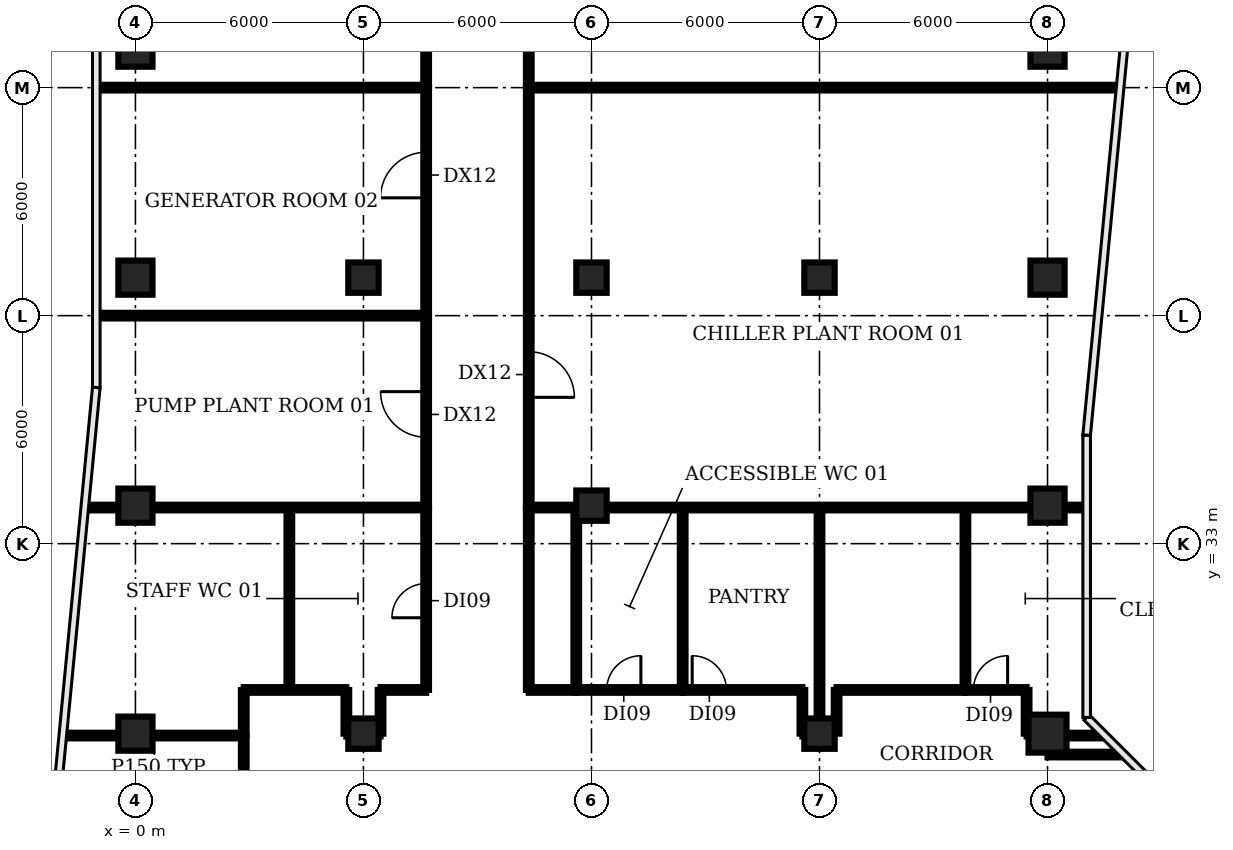
"""IFC4 building model, lengths in metres.
Left out: names, types, materials, properties, quantities, classifications, styles, units other than length and angle.
Written with IfcOpenShell. Run it as: python <this file> out.ifc"""

import sys

from ifc_helpers import new_model, si_unit, direction, frame, frame_2d, origin, origin_2d, place, context, subcontext, project, spatial, rectangle, circle, extrude, element, fill, save


model = new_model("IFC4")
c1 = context("Model", 3, precision=1e-05, world=origin(), true_north=direction((0.0, 1.0)))
c2 = subcontext(c1, "Body", "Model", "MODEL_VIEW")
j1 = project(units=[si_unit("LENGTHUNIT", "METRE"), si_unit("PLANEANGLEUNIT", "RADIAN")], contexts=[c1])
p1 = place(None, origin())
s1 = spatial("IfcSite", under=j1, at=p1, CompositionType="ELEMENT")
p2 = place(p1, origin())
s2 = spatial("IfcBuilding", under=s1, at=p2, CompositionType="ELEMENT")
p3 = place(p2, frame((0.0, 0.0, 251.6)))
s3 = spatial("IfcBuildingStorey", under=s2, at=p3, CompositionType="ELEMENT", Elevation=251.6)
for number, where, z_axis, x_axis in (
    (1, (0.0, 28.0, 0.0), (0.0, 0.0, 1.0), (1.0, 0.0, 0.0)),
    (2, (0.0, 34.0, 0.0), (0.0, 0.0, 1.0), (1.0, 0.0, 0.0)),
    (3, (0.0, 40.0, 0.0), (0.0, 0.0, 1.0), (1.0, 0.0, 0.0)),
    (4, (0.0, 46.0, 0.0), (0.0, 0.0, 1.0), (1.0, 0.0, 0.0)),
):
    element("IfcColumn", number, at=place(p3, frame(where, z_axis=z_axis, x_axis=x_axis)), inside=s3, PredefinedType="COLUMN", context=c2, shape_type="SweptSolid", body=[
        extrude(rectangle(XDim=0.9, YDim=0.9, at=origin_2d()), origin(), (0.0, 0.0, 1.0), 3.2),
    ])
for number, where, z_axis, x_axis in (
    (5, (6.0, 28.0, 0.0), (0.0, 0.0, 1.0), (1.0, 0.0, 0.0)),
    (6, (6.0, 40.0, 0.0), (0.0, 0.0, 1.0), (1.0, 0.0, 0.0)),
    (7, (12.0, 34.0, 0.0), (0.0, 0.0, 1.0), (1.0, 0.0, 0.0)),
    (8, (12.0, 40.0, 0.0), (0.0, 0.0, 1.0), (1.0, 0.0, 0.0)),
    (9, (18.0, 28.0, 0.0), (0.0, 0.0, 1.0), (1.0, 0.0, 0.0)),
    (10, (18.0, 40.0, 0.0), (0.0, 0.0, 1.0), (1.0, 0.0, 0.0)),
):
    element("IfcColumn", number, at=place(p3, frame(where, z_axis=z_axis, x_axis=x_axis)), inside=s3, PredefinedType="COLUMN", context=c2, shape_type="SweptSolid", body=[
        extrude(rectangle(XDim=0.8, YDim=0.8, at=origin_2d()), origin(), (0.0, 0.0, 1.0), 3.2),
    ])
p4 = place(p3, frame((24.0, 28.0, 0.0), z_axis=(0.0, 0.0, 1.0), x_axis=(1.0, 0.0, 0.0)))
e11 = element("IfcColumn", 11, at=p4, inside=s3, PredefinedType="COLUMN", context=c2, shape_type="SweptSolid", body=[
    extrude(circle(Radius=0.5, at=origin_2d()), origin(), (0.0, 0.0, 1.0), 3.2),
])
for number, where, z_axis, x_axis in (
    (12, (24.0, 34.0, 0.0), (0.0, 0.0, 1.0), (1.0, 0.0, 0.0)),
    (13, (24.0, 40.0, 0.0), (0.0, 0.0, 1.0), (1.0, 0.0, 0.0)),
    (14, (24.0, 46.0, 0.0), (0.0, 0.0, 1.0), (1.0, 0.0, 0.0)),
):
    element("IfcColumn", number, at=place(p3, frame(where, z_axis=z_axis, x_axis=x_axis)), inside=s3, PredefinedType="COLUMN", context=c2, shape_type="SweptSolid", body=[
        extrude(rectangle(XDim=0.9, YDim=0.9, at=origin_2d()), origin(), (0.0, 0.0, 1.0), 3.2),
    ])
p5 = place(p3, frame((-1.86, 27.95, 0.0), z_axis=(0.0, 0.0, 1.0), x_axis=(1.0, 0.0, 0.0)))
e15 = element("IfcWall", 15, at=p5, inside=s3, PredefinedType="PARTITIONING", context=c2, shape_type="SweptSolid", body=[
    extrude(rectangle(XDim=4.71, YDim=0.15, at=frame_2d((2.355, 0.0))), origin(), (0.0, 0.0, 1.0), 2.83),
])
p6 = place(p3, frame((-1.28, 33.95, 0.0), z_axis=(0.0, 0.0, 1.0), x_axis=(1.0, 0.0, 0.0)))
e16 = element("IfcWall", 16, at=p6, inside=s3, PredefinedType="PARTITIONING", context=c2, shape_type="SweptSolid", body=[
    extrude(rectangle(XDim=8.93, YDim=0.15, at=frame_2d((4.465, 0.0))), origin(), (0.0, 0.0, 1.0), 2.83),
])
for number, where, z_axis, x_axis in (
    (17, (-0.98, 39.0, 0.0), (0.0, 0.0, 1.0), (1.0, 0.0, 0.0)),
    (18, (-0.98, 45.0, 0.0), (0.0, 0.0, 1.0), (1.0, 0.0, 0.0)),
):
    element("IfcWall", number, at=place(p3, frame(where, z_axis=z_axis, x_axis=x_axis)), inside=s3, PredefinedType="PARTITIONING", context=c2, shape_type="SweptSolid", body=[
        extrude(rectangle(XDim=8.63, YDim=0.15, at=frame_2d((4.315, 0.0))), origin(), (0.0, 0.0, 1.0), 2.83),
    ])
p7 = place(p3, frame((2.85, 25.25, 0.0), z_axis=(0.0, 0.0, 1.0), x_axis=(0.0, 1.0, 0.0)))
e19 = element("IfcWall", 19, at=p7, inside=s3, PredefinedType="PARTITIONING", context=c2, shape_type="SweptSolid", body=[
    extrude(rectangle(XDim=2.7, YDim=0.15, at=frame_2d((1.35, 0.0))), origin(), (0.0, 0.0, 1.0), 2.83),
])
p8 = place(p3, frame((2.85, 27.95, 0.0), z_axis=(0.0, 0.0, 1.0), x_axis=(0.0, 1.0, 0.0)))
e20 = element("IfcWall", 20, at=p8, inside=s3, PredefinedType="PARTITIONING", context=c2, shape_type="SweptSolid", body=[
    extrude(rectangle(XDim=1.2, YDim=0.15, at=frame_2d((0.6, 0.0))), origin(), (0.0, 0.0, 1.0), 2.83),
])
p9 = place(p3, frame((2.85, 29.15, 0.0), z_axis=(0.0, 0.0, 1.0), x_axis=(1.0, 0.0, 0.0)))
e21 = element("IfcWall", 21, at=p9, inside=s3, PredefinedType="PARTITIONING", context=c2, shape_type="SweptSolid", body=[
    extrude(rectangle(XDim=2.7, YDim=0.15, at=frame_2d((1.35, 0.0))), origin(), (0.0, 0.0, 1.0), 2.83),
])
p10 = place(p3, frame((4.05, 29.15, 0.0), z_axis=(0.0, 0.0, 1.0), x_axis=(0.0, 1.0, 0.0)))
e22 = element("IfcWall", 22, at=p10, inside=s3, PredefinedType="PARTITIONING", context=c2, shape_type="SweptSolid", body=[
    extrude(rectangle(XDim=4.8, YDim=0.15, at=frame_2d((2.4, 0.0))), origin(), (0.0, 0.0, 1.0), 2.83),
])
p11 = place(p3, frame((5.55, 28.0, 0.0), z_axis=(0.0, 0.0, 1.0), x_axis=(0.0, 1.0, 0.0)))
e23 = element("IfcWall", 23, at=p11, inside=s3, PredefinedType="PARTITIONING", context=c2, shape_type="SweptSolid", body=[
    extrude(rectangle(XDim=1.15, YDim=0.15, at=frame_2d((0.575, 0.0))), origin(), (0.0, 0.0, 1.0), 2.83),
])
p12 = place(p3, frame((5.55, 28.0, 0.0), z_axis=(0.0, 0.0, 1.0), x_axis=(1.0, 0.0, 0.0)))
e24 = element("IfcWall", 24, at=p12, inside=s3, PredefinedType="PARTITIONING", context=c2, shape_type="SweptSolid", body=[
    extrude(rectangle(XDim=0.9, YDim=0.15, at=frame_2d((0.45, 0.0))), origin(), (0.0, 0.0, 1.0), 2.83),
])
p13 = place(p3, frame((6.45, 28.0, 0.0), z_axis=(0.0, 0.0, 1.0), x_axis=(0.0, 1.0, 0.0)))
e25 = element("IfcWall", 25, at=p13, inside=s3, PredefinedType="PARTITIONING", context=c2, shape_type="SweptSolid", body=[
    extrude(rectangle(XDim=1.15, YDim=0.15, at=frame_2d((0.575, 0.0))), origin(), (0.0, 0.0, 1.0), 2.83),
])
p14 = place(p3, frame((6.45, 29.15, 0.0), z_axis=(0.0, 0.0, 1.0), x_axis=(1.0, 0.0, 0.0)))
e26 = element("IfcWall", 26, at=p14, inside=s3, PredefinedType="PARTITIONING", context=c2, shape_type="SweptSolid", body=[
    extrude(rectangle(XDim=1.2, YDim=0.15, at=frame_2d((0.6, 0.0))), origin(), (0.0, 0.0, 1.0), 2.83),
])
p15 = place(p3, frame((7.65, 29.15, 0.0), z_axis=(0.0, 0.0, 1.0), x_axis=(0.0, 1.0, 0.0)))
e27 = element("IfcWall", 27, at=p15, inside=s3, PredefinedType="PARTITIONING", context=c2, shape_type="SweptSolid", body=[
    extrude(rectangle(XDim=4.8, YDim=0.15, at=frame_2d((2.4, 0.0))), origin(), (0.0, 0.0, 1.0), 2.83),
])
p16 = place(p15, frame((1.9, 0.0, 0.0)))
e28 = element("IfcOpeningElement", 28, at=p16, cuts=e27, PredefinedType="OPENING", context=c2, shape_type="SweptSolid", body=[
    extrude(rectangle(XDim=0.9, YDim=2.1, at=frame_2d((0.45, 1.05))), frame((0.0, 0.085, 0.0), z_axis=(0.0, -1.0, 0.0), x_axis=(1.0, 0.0, 0.0)), (0.0, 0.0, 1.0), 0.17),
])
p17 = place(p3, frame((7.65, 33.95, 0.0), z_axis=(0.0, 0.0, 1.0), x_axis=(0.0, 1.0, 0.0)))
e29 = element("IfcWall", 29, at=p17, inside=s3, PredefinedType="PARTITIONING", context=c2, shape_type="SweptSolid", body=[
    extrude(rectangle(XDim=5.05, YDim=0.15, at=frame_2d((2.525, 0.0))), origin(), (0.0, 0.0, 1.0), 2.83),
])
p18 = place(p17, frame((1.85, 0.0, 0.0)))
e30 = element("IfcOpeningElement", 30, at=p18, cuts=e29, PredefinedType="OPENING", context=c2, shape_type="SweptSolid", body=[
    extrude(rectangle(XDim=1.2, YDim=2.1, at=frame_2d((0.6, 1.05))), frame((0.0, 0.085, 0.0), z_axis=(0.0, -1.0, 0.0), x_axis=(1.0, 0.0, 0.0)), (0.0, 0.0, 1.0), 0.17),
])
p19 = place(p3, frame((7.65, 39.0, 0.0), z_axis=(0.0, 0.0, 1.0), x_axis=(0.0, 1.0, 0.0)))
e31 = element("IfcWall", 31, at=p19, inside=s3, PredefinedType="PARTITIONING", context=c2, shape_type="SweptSolid", body=[
    extrude(rectangle(XDim=6.0, YDim=0.15, at=frame_2d((3.0, 0.0))), origin(), (0.0, 0.0, 1.0), 2.83),
])
p20 = place(p19, frame((3.1, 0.0, 0.0)))
e32 = element("IfcOpeningElement", 32, at=p20, cuts=e31, PredefinedType="OPENING", context=c2, shape_type="SweptSolid", body=[
    extrude(rectangle(XDim=1.2, YDim=2.1, at=frame_2d((0.6, 1.05))), frame((0.0, 0.085, 0.0), z_axis=(0.0, -1.0, 0.0), x_axis=(1.0, 0.0, 0.0)), (0.0, 0.0, 1.0), 0.17),
])
p21 = place(p3, frame((7.65, 45.0, 0.0), z_axis=(0.0, 0.0, 1.0), x_axis=(0.0, 1.0, 0.0)))
e33 = element("IfcWall", 33, at=p21, inside=s3, PredefinedType="PARTITIONING", context=c2, shape_type="SweptSolid", body=[
    extrude(rectangle(XDim=12.0, YDim=0.15, at=frame_2d((6.0, 0.0))), origin(), (0.0, 0.0, 1.0), 2.83),
])
p22 = place(p21, frame((3.7, 0.0, 0.0)))
e34 = element("IfcOpeningElement", 34, at=p22, cuts=e33, PredefinedType="OPENING", context=c2, shape_type="SweptSolid", body=[
    extrude(rectangle(XDim=1.2, YDim=2.1, at=frame_2d((0.6, 1.05))), frame((0.0, 0.085, 0.0), z_axis=(0.0, -1.0, 0.0), x_axis=(1.0, 0.0, 0.0)), (0.0, 0.0, 1.0), 0.17),
])
p23 = place(p3, frame((10.35, 29.15, 0.0), z_axis=(0.0, 0.0, 1.0), x_axis=(0.0, 1.0, 0.0)))
e35 = element("IfcWall", 35, at=p23, inside=s3, PredefinedType="PARTITIONING", context=c2, shape_type="SweptSolid", body=[
    extrude(rectangle(XDim=4.8, YDim=0.15, at=frame_2d((2.4, 0.0))), origin(), (0.0, 0.0, 1.0), 2.83),
])
p24 = place(p3, frame((10.35, 29.15, 0.0), z_axis=(0.0, 0.0, 1.0), x_axis=(1.0, 0.0, 0.0)))
e36 = element("IfcWall", 36, at=p24, inside=s3, PredefinedType="PARTITIONING", context=c2, shape_type="SweptSolid", body=[
    extrude(rectangle(XDim=1.25, YDim=0.15, at=frame_2d((0.625, 0.0))), origin(), (0.0, 0.0, 1.0), 2.83),
])
p25 = place(p3, frame((10.35, 33.95, 0.0), z_axis=(0.0, 0.0, 1.0), x_axis=(1.0, 0.0, 0.0)))
e37 = element("IfcWall", 37, at=p25, inside=s3, PredefinedType="PARTITIONING", context=c2, shape_type="SweptSolid", body=[
    extrude(rectangle(XDim=14.63, YDim=0.15, at=frame_2d((7.315, 0.0))), origin(), (0.0, 0.0, 1.0), 2.83),
])
p26 = place(p3, frame((10.35, 45.0, 0.0), z_axis=(0.0, 0.0, 1.0), x_axis=(0.0, -1.0, 0.0)))
e38 = element("IfcWall", 38, at=p26, inside=s3, PredefinedType="PARTITIONING", context=c2, shape_type="SweptSolid", body=[
    extrude(rectangle(XDim=11.05, YDim=0.15, at=frame_2d((5.525, 0.0))), origin(), (0.0, 0.0, 1.0), 2.83),
])
p27 = place(p26, frame((6.95, 0.0, 0.0)))
e39 = element("IfcOpeningElement", 39, at=p27, cuts=e38, PredefinedType="OPENING", context=c2, shape_type="SweptSolid", body=[
    extrude(rectangle(XDim=1.2, YDim=2.1, at=frame_2d((0.6, 1.05))), frame((0.0, 0.085, 0.0), z_axis=(0.0, -1.0, 0.0), x_axis=(1.0, 0.0, 0.0)), (0.0, 0.0, 1.0), 0.17),
])
p28 = place(p3, frame((10.35, 45.0, 0.0), z_axis=(0.0, 0.0, 1.0), x_axis=(1.0, 0.0, 0.0)))
e40 = element("IfcWall", 40, at=p28, inside=s3, PredefinedType="PARTITIONING", context=c2, shape_type="SweptSolid", body=[
    extrude(rectangle(XDim=15.51, YDim=0.15, at=frame_2d((7.755, 0.0))), origin(), (0.0, 0.0, 1.0), 2.83),
])
p29 = place(p3, frame((10.35, 51.0, 0.0), z_axis=(0.0, 0.0, 1.0), x_axis=(0.0, -1.0, 0.0)))
e41 = element("IfcWall", 41, at=p29, inside=s3, PredefinedType="PARTITIONING", context=c2, shape_type="SweptSolid", body=[
    extrude(rectangle(XDim=6.0, YDim=0.15, at=frame_2d((3.0, 0.0))), origin(), (0.0, 0.0, 1.0), 2.83),
])
p30 = place(p29, frame((2.5, 0.0, 0.0)))
e42 = element("IfcOpeningElement", 42, at=p30, cuts=e41, PredefinedType="OPENING", context=c2, shape_type="SweptSolid", body=[
    extrude(rectangle(XDim=1.2, YDim=2.1, at=frame_2d((0.6, 1.05))), frame((0.0, 0.085, 0.0), z_axis=(0.0, -1.0, 0.0), x_axis=(1.0, 0.0, 0.0)), (0.0, 0.0, 1.0), 0.17),
])
p31 = place(p3, frame((11.6, 29.15, 0.0), z_axis=(0.0, 0.0, 1.0), x_axis=(0.0, 1.0, 0.0)))
e43 = element("IfcWall", 43, at=p31, inside=s3, PredefinedType="PARTITIONING", context=c2, shape_type="SweptSolid", body=[
    extrude(rectangle(XDim=4.6, YDim=0.15, at=frame_2d((2.3, 0.0))), origin(), (0.0, 0.0, 1.0), 2.83),
])
p32 = place(p3, frame((11.6, 29.15, 0.0), z_axis=(0.0, 0.0, 1.0), x_axis=(1.0, 0.0, 0.0)))
e44 = element("IfcWall", 44, at=p32, inside=s3, PredefinedType="PARTITIONING", context=c2, shape_type="SweptSolid", body=[
    extrude(rectangle(XDim=2.8, YDim=0.15, at=frame_2d((1.4, 0.0))), origin(), (0.0, 0.0, 1.0), 2.83),
])
p33 = place(p32, frame((0.8, 0.0, 0.0)))
e45 = element("IfcOpeningElement", 45, at=p33, cuts=e44, PredefinedType="OPENING", context=c2, shape_type="SweptSolid", body=[
    extrude(rectangle(XDim=0.9, YDim=2.1, at=frame_2d((0.45, 1.05))), frame((0.0, 0.085, 0.0), z_axis=(0.0, -1.0, 0.0), x_axis=(1.0, 0.0, 0.0)), (0.0, 0.0, 1.0), 0.17),
])
p34 = place(p3, frame((14.4, 29.15, 0.0), z_axis=(0.0, 0.0, 1.0), x_axis=(0.0, 1.0, 0.0)))
e46 = element("IfcWall", 46, at=p34, inside=s3, PredefinedType="PARTITIONING", context=c2, shape_type="SweptSolid", body=[
    extrude(rectangle(XDim=4.8, YDim=0.15, at=frame_2d((2.4, 0.0))), origin(), (0.0, 0.0, 1.0), 2.83),
])
p35 = place(p3, frame((14.4, 29.15, 0.0), z_axis=(0.0, 0.0, 1.0), x_axis=(1.0, 0.0, 0.0)))
e47 = element("IfcWall", 47, at=p35, inside=s3, PredefinedType="PARTITIONING", context=c2, shape_type="SweptSolid", body=[
    extrude(rectangle(XDim=3.15, YDim=0.15, at=frame_2d((1.575, 0.0))), origin(), (0.0, 0.0, 1.0), 2.83),
])
p36 = place(p35, frame((0.25, 0.0, 0.0)))
e48 = element("IfcOpeningElement", 48, at=p36, cuts=e47, PredefinedType="OPENING", context=c2, shape_type="SweptSolid", body=[
    extrude(rectangle(XDim=0.9, YDim=2.1, at=frame_2d((0.45, 1.05))), frame((0.0, 0.085, 0.0), z_axis=(0.0, -1.0, 0.0), x_axis=(1.0, 0.0, 0.0)), (0.0, 0.0, 1.0), 0.17),
])
p37 = place(p3, frame((17.55, 28.0, 0.0), z_axis=(0.0, 0.0, 1.0), x_axis=(0.0, 1.0, 0.0)))
e49 = element("IfcWall", 49, at=p37, inside=s3, PredefinedType="PARTITIONING", context=c2, shape_type="SweptSolid", body=[
    extrude(rectangle(XDim=1.15, YDim=0.15, at=frame_2d((0.575, 0.0))), origin(), (0.0, 0.0, 1.0), 2.83),
])
p38 = place(p3, frame((17.55, 28.0, 0.0), z_axis=(0.0, 0.0, 1.0), x_axis=(1.0, 0.0, 0.0)))
e50 = element("IfcWall", 50, at=p38, inside=s3, PredefinedType="PARTITIONING", context=c2, shape_type="SweptSolid", body=[
    extrude(rectangle(XDim=0.45, YDim=0.15, at=frame_2d((0.225, 0.0))), origin(), (0.0, 0.0, 1.0), 2.83),
])
p39 = place(p3, frame((18.0, 28.0, 0.0), z_axis=(0.0, 0.0, 1.0), x_axis=(0.0, 1.0, 0.0)))
e51 = element("IfcWall", 51, at=p39, inside=s3, PredefinedType="PARTITIONING", context=c2, shape_type="SweptSolid", body=[
    extrude(rectangle(XDim=5.95, YDim=0.15, at=frame_2d((2.975, 0.0))), origin(), (0.0, 0.0, 1.0), 2.83),
])
p40 = place(p3, frame((18.45, 28.0, 0.0), z_axis=(0.0, 0.0, 1.0), x_axis=(0.0, 1.0, 0.0)))
e52 = element("IfcWall", 52, at=p40, inside=s3, PredefinedType="PARTITIONING", context=c2, shape_type="SweptSolid", body=[
    extrude(rectangle(XDim=1.15, YDim=0.15, at=frame_2d((0.575, 0.0))), origin(), (0.0, 0.0, 1.0), 2.83),
])
p41 = place(p3, frame((18.45, 29.15, 0.0), z_axis=(0.0, 0.0, 1.0), x_axis=(1.0, 0.0, 0.0)))
e53 = element("IfcWall", 53, at=p41, inside=s3, PredefinedType="PARTITIONING", context=c2, shape_type="SweptSolid", body=[
    extrude(rectangle(XDim=3.39, YDim=0.15, at=frame_2d((1.695, 0.0))), origin(), (0.0, 0.0, 1.0), 2.83),
])
p42 = place(p3, frame((21.84, 29.15, 0.0), z_axis=(0.0, 0.0, 1.0), x_axis=(0.0, 1.0, 0.0)))
e54 = element("IfcWall", 54, at=p42, inside=s3, PredefinedType="PARTITIONING", context=c2, shape_type="SweptSolid", body=[
    extrude(rectangle(XDim=4.8, YDim=0.15, at=frame_2d((2.4, 0.0))), origin(), (0.0, 0.0, 1.0), 2.83),
])
p43 = place(p3, frame((21.84, 29.15, 0.0), z_axis=(0.0, 0.0, 1.0), x_axis=(1.0, 0.0, 0.0)))
e55 = element("IfcWall", 55, at=p43, inside=s3, PredefinedType="PARTITIONING", context=c2, shape_type="SweptSolid", body=[
    extrude(rectangle(XDim=1.61, YDim=0.15, at=frame_2d((0.805, 0.0))), origin(), (0.0, 0.0, 1.0), 2.83),
])
p44 = place(p43, frame((0.21, 0.0, 0.0)))
e56 = element("IfcOpeningElement", 56, at=p44, cuts=e55, PredefinedType="OPENING", context=c2, shape_type="SweptSolid", body=[
    extrude(rectangle(XDim=0.9, YDim=2.1, at=frame_2d((0.45, 1.05))), frame((0.0, 0.085, 0.0), z_axis=(0.0, -1.0, 0.0), x_axis=(1.0, 0.0, 0.0)), (0.0, 0.0, 1.0), 0.17),
])
p45 = place(p3, frame((23.45, 28.0, 0.0), z_axis=(0.0, 0.0, 1.0), x_axis=(0.0, 1.0, 0.0)))
e57 = element("IfcWall", 57, at=p45, inside=s3, PredefinedType="PARTITIONING", context=c2, shape_type="SweptSolid", body=[
    extrude(rectangle(XDim=1.15, YDim=0.15, at=frame_2d((0.575, 0.0))), origin(), (0.0, 0.0, 1.0), 2.83),
])
p46 = place(p3, frame((23.45, 28.0, 0.0), z_axis=(0.0, 0.0, 1.0), x_axis=(1.0, 0.0, 0.0)))
e58 = element("IfcWall", 58, at=p46, inside=s3, PredefinedType="PARTITIONING", context=c2, shape_type="SweptSolid", body=[
    extrude(rectangle(XDim=0.55, YDim=0.15, at=frame_2d((0.275, 0.0))), origin(), (0.0, 0.0, 1.0), 2.83),
])
p47 = place(p3, frame((24.0, 27.45, 0.0), z_axis=(0.0, 0.0, 1.0), x_axis=(1.0, 0.0, 0.0)))
e59 = element("IfcWall", 59, at=p47, inside=s3, PredefinedType="PARTITIONING", context=c2, shape_type="SweptSolid", body=[
    extrude(rectangle(XDim=1.94, YDim=0.15, at=frame_2d((0.97, 0.0))), origin(), (0.0, 0.0, 1.0), 2.83),
])
p48 = place(p3, frame((24.0, 27.95, 0.0), z_axis=(0.0, 0.0, 1.0), x_axis=(1.0, 0.0, 0.0)))
e60 = element("IfcWall", 60, at=p48, inside=s3, PredefinedType="PARTITIONING", context=c2, shape_type="SweptSolid", body=[
    extrude(rectangle(XDim=1.44, YDim=0.15, at=frame_2d((0.72, 0.0))), origin(), (0.0, 0.0, 1.0), 2.83),
])
p49 = place(p16, origin())
e61 = element("IfcDoor", 61, at=p49, inside=s3, OperationType="SINGLE_SWING_LEFT", PredefinedType="DOOR", context=c2, shape_type="SweptSolid", body=[
    extrude(rectangle(XDim=0.9, YDim=2.1, at=frame_2d((0.45, 1.05))), frame((0.0, 0.025, 0.0), z_axis=(0.0, -1.0, 0.0), x_axis=(1.0, 0.0, 0.0)), (0.0, 0.0, 1.0), 0.05),
])
fill(e28, e61)
p50 = place(p18, origin())
e62 = element("IfcDoor", 62, at=p50, inside=s3, OperationType="SINGLE_SWING_RIGHT", PredefinedType="DOOR", context=c2, shape_type="SweptSolid", body=[
    extrude(rectangle(XDim=1.2, YDim=2.1, at=frame_2d((0.6, 1.05))), frame((0.0, 0.025, 0.0), z_axis=(0.0, -1.0, 0.0), x_axis=(1.0, 0.0, 0.0)), (0.0, 0.0, 1.0), 0.05),
])
fill(e30, e62)
p51 = place(p20, origin())
e63 = element("IfcDoor", 63, at=p51, inside=s3, OperationType="SINGLE_SWING_LEFT", PredefinedType="DOOR", context=c2, shape_type="SweptSolid", body=[
    extrude(rectangle(XDim=1.2, YDim=2.1, at=frame_2d((0.6, 1.05))), frame((0.0, 0.025, 0.0), z_axis=(0.0, -1.0, 0.0), x_axis=(1.0, 0.0, 0.0)), (0.0, 0.0, 1.0), 0.05),
])
fill(e32, e63)
p52 = place(p27, origin())
e64 = element("IfcDoor", 64, at=p52, inside=s3, OperationType="SINGLE_SWING_RIGHT", PredefinedType="DOOR", context=c2, shape_type="SweptSolid", body=[
    extrude(rectangle(XDim=1.2, YDim=2.1, at=frame_2d((0.6, 1.05))), frame((0.0, 0.025, 0.0), z_axis=(0.0, -1.0, 0.0), x_axis=(1.0, 0.0, 0.0)), (0.0, 0.0, 1.0), 0.05),
])
fill(e39, e64)
p53 = place(p33, origin())
e65 = element("IfcDoor", 65, at=p53, inside=s3, OperationType="SINGLE_SWING_RIGHT", PredefinedType="DOOR", context=c2, shape_type="SweptSolid", body=[
    extrude(rectangle(XDim=0.9, YDim=2.1, at=frame_2d((0.45, 1.05))), frame((0.0, 0.025, 0.0), z_axis=(0.0, -1.0, 0.0), x_axis=(1.0, 0.0, 0.0)), (0.0, 0.0, 1.0), 0.05),
])
fill(e45, e65)
p54 = place(p36, origin())
e66 = element("IfcDoor", 66, at=p54, inside=s3, OperationType="SINGLE_SWING_LEFT", PredefinedType="DOOR", context=c2, shape_type="SweptSolid", body=[
    extrude(rectangle(XDim=0.9, YDim=2.1, at=frame_2d((0.45, 1.05))), frame((0.0, 0.025, 0.0), z_axis=(0.0, -1.0, 0.0), x_axis=(1.0, 0.0, 0.0)), (0.0, 0.0, 1.0), 0.05),
])
fill(e48, e66)
p55 = place(p44, origin())
e67 = element("IfcDoor", 67, at=p55, inside=s3, OperationType="SINGLE_SWING_RIGHT", PredefinedType="DOOR", context=c2, shape_type="SweptSolid", body=[
    extrude(rectangle(XDim=0.9, YDim=2.1, at=frame_2d((0.45, 1.05))), frame((0.0, 0.025, 0.0), z_axis=(0.0, -1.0, 0.0), x_axis=(1.0, 0.0, 0.0)), (0.0, 0.0, 1.0), 0.05),
])
fill(e56, e67)
save(model, sys.argv[1])
